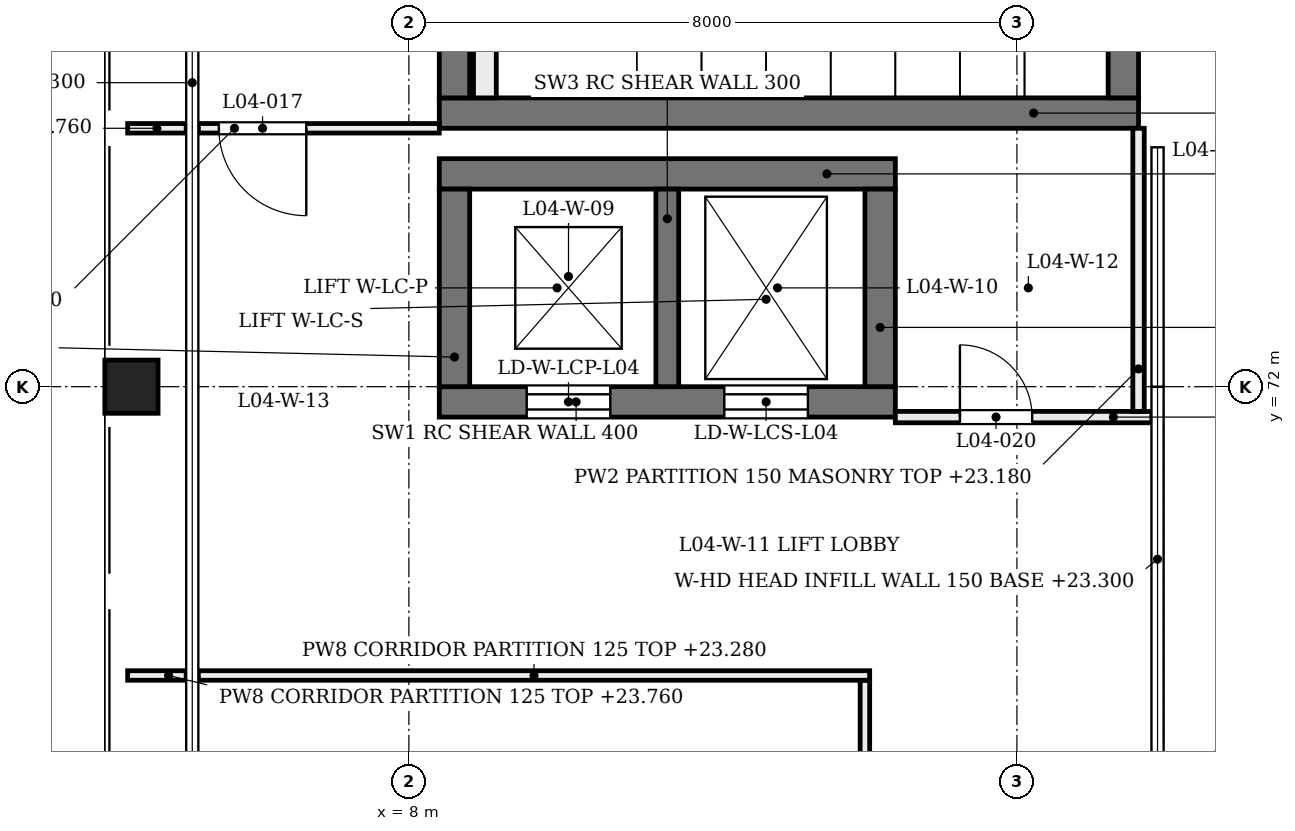
"""IFC4 building model, lengths in metres.
Left out: names, types, materials, properties, quantities, classifications, styles, units other than length and angle.
Written with IfcOpenShell. Run it as: python <this file> out.ifc"""

import sys

from ifc_helpers import new_model, si_unit, direction, frame, frame_2d, origin, origin_2d, place, context, subcontext, project, spatial, rectangle, extrude, element, fill, save


model = new_model("IFC4")
c1 = context("Model", 3, precision=1e-05, world=origin(), true_north=direction((0.0, 1.0)))
c2 = subcontext(c1, "Body", "Model", "MODEL_VIEW")
j1 = project(units=[si_unit("LENGTHUNIT", "METRE"), si_unit("PLANEANGLEUNIT", "RADIAN")], contexts=[c1])
p1 = place(None, origin())
s1 = spatial("IfcSite", under=j1, at=p1, CompositionType="ELEMENT")
p2 = place(p1, origin())
s2 = spatial("IfcBuilding", under=s1, at=p2, CompositionType="ELEMENT")
p3 = place(p2, frame((0.0, 0.0, 19.2)))
s3 = spatial("IfcBuildingStorey", under=s2, at=p3, CompositionType="ELEMENT", Elevation=19.2)
p4 = place(p3, frame((8.4, 75.6, 0.0), z_axis=(0.0, 0.0, 1.0), x_axis=(1.0, 0.0, 0.0)))
e1 = element("IfcWall", 1, at=p4, inside=s3, PredefinedType="SHEAR", context=c2, shape_type="SweptSolid", body=[
    extrude(rectangle(XDim=9.2, YDim=0.4, at=frame_2d((4.6, 0.0))), origin(), (0.0, 0.0, 1.0), 4.58),
])
p5 = place(p3, frame((8.6, 75.8, 0.0), z_axis=(0.0, 0.0, 1.0), x_axis=(0.0, 1.0, 0.0)))
e2 = element("IfcWall", 2, at=p5, inside=s3, PredefinedType="SHEAR", context=c2, shape_type="SweptSolid", body=[
    extrude(rectangle(XDim=7.0, YDim=0.4, at=frame_2d((3.5, 0.0))), origin(), (0.0, 0.0, 1.0), 4.58),
])
p6 = place(p3, frame((17.4, 75.8, 0.0), z_axis=(0.0, 0.0, 1.0), x_axis=(0.0, 1.0, 0.0)))
e3 = element("IfcWall", 3, at=p6, inside=s3, PredefinedType="SHEAR", context=c2, shape_type="SweptSolid", body=[
    extrude(rectangle(XDim=7.0, YDim=0.4, at=frame_2d((3.5, 0.0))), origin(), (0.0, 0.0, 1.0), 4.58),
])
p7 = place(p6, frame((2.252, 0.0, 0.0)))
e4 = element("IfcOpeningElement", 4, at=p7, cuts=e3, PredefinedType="OPENING", context=c2, shape_type="SweptSolid", body=[
    extrude(rectangle(XDim=1.5, YDim=2.1, at=frame_2d((0.75, 1.05))), frame((0.0, 0.21, 0.0), z_axis=(0.0, -1.0, 0.0), x_axis=(1.0, 0.0, 0.0)), (0.0, 0.0, 1.0), 0.42),
])
p8 = place(p6, frame((3.2, 0.0, 3.72)))
e5 = element("IfcOpeningElement", 5, at=p8, cuts=e3, PredefinedType="OPENING", context=c2, shape_type="SweptSolid", body=[
    extrude(rectangle(XDim=0.6, YDim=0.5, at=frame_2d((0.3, 0.25))), frame((0.0, 0.21, 0.0), z_axis=(0.0, -1.0, 0.0), x_axis=(1.0, 0.0, 0.0)), (0.0, 0.0, 1.0), 0.42),
])
p9 = place(p3, frame((8.4, 71.8, 0.0), z_axis=(0.0, 0.0, 1.0), x_axis=(1.0, 0.0, 0.0)))
e6 = element("IfcWall", 6, at=p9, inside=s3, PredefinedType="SHEAR", context=c2, shape_type="SweptSolid", body=[
    extrude(rectangle(XDim=6.0, YDim=0.4, at=frame_2d((3.0, 0.0))), origin(), (0.0, 0.0, 1.0), 4.58),
])
p10 = place(p9, frame((1.15, 0.0, 0.0)))
e7 = element("IfcOpeningElement", 7, at=p10, cuts=e6, PredefinedType="OPENING", context=c2, shape_type="SweptSolid", body=[
    extrude(rectangle(XDim=1.1, YDim=2.1, at=frame_2d((0.55, 1.05))), frame((0.0, 0.21, 0.0), z_axis=(0.0, -1.0, 0.0), x_axis=(1.0, 0.0, 0.0)), (0.0, 0.0, 1.0), 0.42),
])
p11 = place(p9, frame((3.75, 0.0, 0.0)))
e8 = element("IfcOpeningElement", 8, at=p11, cuts=e6, PredefinedType="OPENING", context=c2, shape_type="SweptSolid", body=[
    extrude(rectangle(XDim=1.1, YDim=2.1, at=frame_2d((0.55, 1.05))), frame((0.0, 0.21, 0.0), z_axis=(0.0, -1.0, 0.0), x_axis=(1.0, 0.0, 0.0)), (0.0, 0.0, 1.0), 0.42),
])
p12 = place(p3, frame((8.4, 74.8, 0.0), z_axis=(0.0, 0.0, 1.0), x_axis=(1.0, 0.0, 0.0)))
e9 = element("IfcWall", 9, at=p12, inside=s3, PredefinedType="SHEAR", context=c2, shape_type="SweptSolid", body=[
    extrude(rectangle(XDim=6.0, YDim=0.4, at=frame_2d((3.0, 0.0))), origin(), (0.0, 0.0, 1.0), 4.58),
])
for number, where, z_axis, x_axis in (
    (10, (8.6, 72.0, 0.0), (0.0, 0.0, 1.0), (0.0, 1.0, 0.0)),
    (11, (14.2, 72.0, 0.0), (0.0, 0.0, 1.0), (0.0, 1.0, 0.0)),
):
    element("IfcWall", number, at=place(p3, frame(where, z_axis=z_axis, x_axis=x_axis)), inside=s3, PredefinedType="SHEAR", context=c2, shape_type="SweptSolid", body=[
        extrude(rectangle(XDim=2.6, YDim=0.4, at=frame_2d((1.3, 0.0))), origin(), (0.0, 0.0, 1.0), 4.58),
    ])
p13 = place(p3, frame((11.4, 72.0, 0.0), z_axis=(0.0, 0.0, 1.0), x_axis=(0.0, 1.0, 0.0)))
e12 = element("IfcWall", 12, at=p13, inside=s3, PredefinedType="SHEAR", context=c2, shape_type="SweptSolid", body=[
    extrude(rectangle(XDim=2.6, YDim=0.3, at=frame_2d((1.3, 0.0))), origin(), (0.0, 0.0, 1.0), 4.58),
])
for number, where, z_axis, x_axis in (
    (13, (4.6, 72.0, 0.0), (-0.204, 0.0, 0.979), (0.0, -1.0, 0.0)),
    (14, (19.4, 72.0, 0.0), (-0.204, 0.0, 0.979), (0.0, -1.0, 0.0)),
):
    element("IfcColumn", number, at=place(p3, frame(where, z_axis=z_axis, x_axis=x_axis)), inside=s3, PredefinedType="COLUMN", context=c2, shape_type="SweptSolid", body=[
        extrude(rectangle(XDim=0.7, YDim=0.7, at=origin_2d()), origin(), (0.0, 0.0, 1.0), 4.903),
    ])
p14 = place(p3, frame((5.15, 64.9, 4.1), z_axis=(0.0, 0.0, 1.0), x_axis=(0.0, 1.0, 0.0)))
e15 = element("IfcWall", 15, at=p14, inside=s3, PredefinedType="SOLIDWALL", context=c2, shape_type="SweptSolid", body=[
    extrude(rectangle(XDim=6.9, YDim=0.15, at=frame_2d((3.45, 0.0))), origin(), (0.0, 0.0, 1.0), 0.48),
])
p15 = place(p3, frame((5.15, 72.2, 4.1), z_axis=(0.0, 0.0, 1.0), x_axis=(0.0, 1.0, 0.0)))
e16 = element("IfcWall", 16, at=p15, inside=s3, PredefinedType="SOLIDWALL", context=c2, shape_type="SweptSolid", body=[
    extrude(rectangle(XDim=7.6, YDim=0.15, at=frame_2d((3.8, 0.0))), origin(), (0.0, 0.0, 1.0), 0.48),
])
p16 = place(p3, frame((17.85, 64.9, 4.1), z_axis=(0.0, 0.0, 1.0), x_axis=(0.0, 1.0, 0.0)))
e17 = element("IfcWall", 17, at=p16, inside=s3, PredefinedType="SOLIDWALL", context=c2, shape_type="SweptSolid", body=[
    extrude(rectangle(XDim=6.9, YDim=0.15, at=frame_2d((3.45, 0.0))), origin(), (0.0, 0.0, 1.0), 0.48),
])
p17 = place(p3, frame((14.0, 64.1, 0.0), z_axis=(0.0, 0.0, 1.0), x_axis=(0.0, 1.0, 0.0)))
e18 = element("IfcWall", 18, at=p17, inside=s3, PredefinedType="PARTITIONING", context=c2, shape_type="SweptSolid", body=[
    extrude(rectangle(XDim=4.037, YDim=0.125, at=frame_2d((2.019, 0.0))), origin(), (0.0, 0.0, 1.0), 3.88),
])
p18 = place(p17, frame((1.75, 0.0, 0.0)))
e19 = element("IfcOpeningElement", 19, at=p18, cuts=e18, PredefinedType="OPENING", context=c2, shape_type="SweptSolid", body=[
    extrude(rectangle(XDim=1.15, YDim=2.1, at=frame_2d((0.575, 1.05))), frame((0.0, 0.073, 0.0), z_axis=(0.0, -1.0, 0.0), x_axis=(1.0, 0.0, 0.0)), (0.0, 0.0, 1.0), 0.145),
])
p19 = place(p3, frame((4.3, 68.2, 0.0), z_axis=(0.0, 0.0, 1.0), x_axis=(1.0, 0.0, 0.0)))
e20 = element("IfcWall", 20, at=p19, inside=s3, PredefinedType="PARTITIONING", context=c2, shape_type="SweptSolid", body=[
    extrude(rectangle(XDim=0.77, YDim=0.125, at=frame_2d((0.385, 0.0))), origin(), (0.0, 0.0, 1.0), 4.56),
])
p20 = place(p3, frame((5.23, 68.2, 0.0), z_axis=(0.0, 0.0, 1.0), x_axis=(1.0, 0.0, 0.0)))
e21 = element("IfcWall", 21, at=p20, inside=s3, PredefinedType="PARTITIONING", context=c2, shape_type="SweptSolid", body=[
    extrude(rectangle(XDim=8.833, YDim=0.125, at=frame_2d((4.416, 0.0))), origin(), (0.0, 0.0, 1.0), 4.08),
])
p21 = place(p3, frame((4.3, 75.4, 0.0), z_axis=(0.0, 0.0, 1.0), x_axis=(1.0, 0.0, 0.0)))
e22 = element("IfcWall", 22, at=p21, inside=s3, PredefinedType="PARTITIONING", context=c2, shape_type="SweptSolid", body=[
    extrude(rectangle(XDim=0.77, YDim=0.125, at=frame_2d((0.385, 0.0))), origin(), (0.0, 0.0, 1.0), 4.56),
])
p22 = place(p3, frame((5.23, 75.4, 0.0), z_axis=(0.0, 0.0, 1.0), x_axis=(1.0, 0.0, 0.0)))
e23 = element("IfcWall", 23, at=p22, inside=s3, PredefinedType="PARTITIONING", context=c2, shape_type="SweptSolid", body=[
    extrude(rectangle(XDim=3.17, YDim=0.125, at=frame_2d((1.585, 0.0))), origin(), (0.0, 0.0, 1.0), 4.56),
])
p23 = place(p22, frame((0.27, 0.0, 0.0)))
e24 = element("IfcOpeningElement", 24, at=p23, cuts=e23, PredefinedType="OPENING", context=c2, shape_type="SweptSolid", body=[
    extrude(rectangle(XDim=1.15, YDim=2.1, at=frame_2d((0.575, 1.05))), frame((0.0, 0.073, 0.0), z_axis=(0.0, -1.0, 0.0), x_axis=(1.0, 0.0, 0.0)), (0.0, 0.0, 1.0), 0.145),
])
p24 = place(p3, frame((14.4, 71.6, 0.0), z_axis=(0.0, 0.0, 1.0), x_axis=(1.0, 0.0, 0.0)))
e25 = element("IfcWall", 25, at=p24, inside=s3, PredefinedType="PARTITIONING", context=c2, shape_type="SweptSolid", body=[
    extrude(rectangle(XDim=3.375, YDim=0.15, at=frame_2d((1.688, 0.0))), origin(), (0.0, 0.0, 1.0), 4.56),
])
p25 = place(p24, frame((0.85, 0.0, 0.0)))
e26 = element("IfcOpeningElement", 26, at=p25, cuts=e25, PredefinedType="OPENING", context=c2, shape_type="SweptSolid", body=[
    extrude(rectangle(XDim=0.95, YDim=2.1, at=frame_2d((0.475, 1.05))), frame((0.0, 0.085, 0.0), z_axis=(0.0, -1.0, 0.0), x_axis=(1.0, 0.0, 0.0)), (0.0, 0.0, 1.0), 0.17),
])
p26 = place(p3, frame((17.6, 71.675, 0.0), z_axis=(0.0, 0.0, 1.0), x_axis=(0.0, 1.0, 0.0)))
e27 = element("IfcWall", 27, at=p26, inside=s3, PredefinedType="PARTITIONING", context=c2, shape_type="SweptSolid", body=[
    extrude(rectangle(XDim=3.725, YDim=0.15, at=frame_2d((1.862, 0.0))), origin(), (0.0, 0.0, 1.0), 3.98),
])
p27 = place(p3, frame((9.0, 75.8, 0.0), z_axis=(0.0, 0.0, 1.0), x_axis=(0.0, 1.0, 0.0)))
e28 = element("IfcWall", 28, at=p27, inside=s3, PredefinedType="PARTITIONING", context=c2, shape_type="SweptSolid", body=[
    extrude(rectangle(XDim=7.0, YDim=0.3, at=frame_2d((3.5, 0.0))), origin(), (0.0, 0.0, 1.0), 6.95),
])
p28 = place(p10, frame((1.1, 0.0, 0.0), z_axis=(0.0, 0.0, 1.0), x_axis=(-1.0, 0.0, 0.0)))
e29 = element("IfcDoor", 29, at=p28, inside=s3, OperationType="DOUBLE_DOOR_SLIDING", PredefinedType="DOOR", context=c2, shape_type="SweptSolid", body=[
    extrude(rectangle(XDim=1.1, YDim=2.1, at=frame_2d((0.55, 1.05))), frame((0.0, 0.025, 0.0), z_axis=(0.0, -1.0, 0.0), x_axis=(1.0, 0.0, 0.0)), (0.0, 0.0, 1.0), 0.05),
])
fill(e7, e29)
p29 = place(p11, frame((1.1, 0.0, 0.0), z_axis=(0.0, 0.0, 1.0), x_axis=(-1.0, 0.0, 0.0)))
e30 = element("IfcDoor", 30, at=p29, inside=s3, OperationType="DOUBLE_DOOR_SLIDING", PredefinedType="DOOR", context=c2, shape_type="SweptSolid", body=[
    extrude(rectangle(XDim=1.1, YDim=2.1, at=frame_2d((0.55, 1.05))), frame((0.0, 0.025, 0.0), z_axis=(0.0, -1.0, 0.0), x_axis=(1.0, 0.0, 0.0)), (0.0, 0.0, 1.0), 0.05),
])
fill(e8, e30)
p30 = place(p23, origin())
e31 = element("IfcDoor", 31, at=p30, inside=s3, OperationType="SINGLE_SWING_RIGHT", PredefinedType="DOOR", context=c2, shape_type="SweptSolid", body=[
    extrude(rectangle(XDim=1.15, YDim=2.1, at=frame_2d((0.575, 1.05))), frame((0.0, 0.025, 0.0), z_axis=(0.0, -1.0, 0.0), x_axis=(1.0, 0.0, 0.0)), (0.0, 0.0, 1.0), 0.05),
])
fill(e24, e31)
p31 = place(p25, origin())
e32 = element("IfcDoor", 32, at=p31, inside=s3, OperationType="SINGLE_SWING_LEFT", PredefinedType="DOOR", context=c2, shape_type="SweptSolid", body=[
    extrude(rectangle(XDim=0.95, YDim=2.1, at=frame_2d((0.475, 1.05))), frame((0.0, 0.025, 0.0), z_axis=(0.0, -1.0, 0.0), x_axis=(1.0, 0.0, 0.0)), (0.0, 0.0, 1.0), 0.05),
])
fill(e26, e32)
save(model, sys.argv[1])
